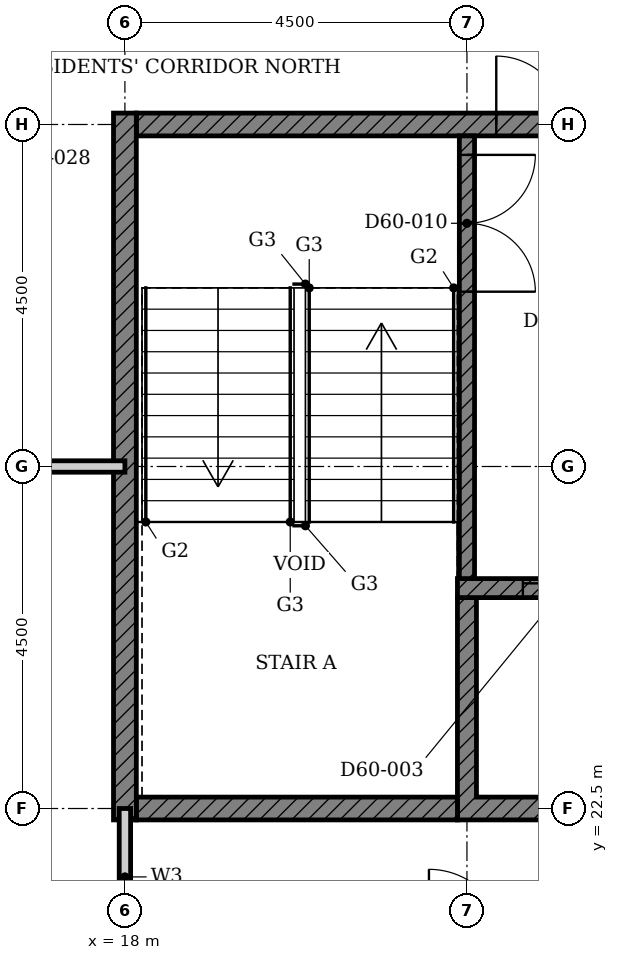
"""IFC4 building model, lengths in metres.
Left out: names, types, materials, properties, quantities, classifications, styles, units other than length and angle.
Written with IfcOpenShell. Run it as: python <this file> out.ifc"""

import sys

from ifc_helpers import new_model, si_unit, direction, frame, frame_2d, origin, place, context, subcontext, project, spatial, polyline, rectangle, outline, extrude, element, fill, save


model = new_model("IFC4")
c1 = context("Model", 3, precision=1e-05, world=origin(), true_north=direction((0.0, 1.0)))
c2 = subcontext(c1, "Body", "Model", "MODEL_VIEW")
j1 = project(units=[si_unit("LENGTHUNIT", "METRE"), si_unit("PLANEANGLEUNIT", "RADIAN")], contexts=[c1])
p1 = place(None, origin())
s1 = spatial("IfcSite", under=j1, at=p1, CompositionType="ELEMENT")
p2 = place(p1, origin())
s2 = spatial("IfcBuilding", under=s1, at=p2, CompositionType="ELEMENT")
p3 = place(p2, frame((0.0, 0.0, 237.9)))
s3 = spatial("IfcBuildingStorey", under=s2, at=p3, CompositionType="ELEMENT", Elevation=237.9)
p4 = place(p3, origin())
e1 = element("IfcWall", 1, at=p4, inside=s3, PredefinedType="SHEAR", context=c2, shape_type="SweptSolid", body=[
    extrude(outline(polyline([(22.375, 22.35), (25.197, 22.35), (25.197, 25.275), (24.947, 25.275), (24.947, 22.65), (22.625, 22.65), (22.625, 25.275), (22.375, 25.275), (22.375, 22.35)])), origin(), (0.0, 0.0, 1.0), 3.4),
])
p5 = place(p3, frame((18.15, 22.5, 0.0), z_axis=(0.0, 0.0, 1.0), x_axis=(1.0, 0.0, 0.0)))
e2 = element("IfcWall", 2, at=p5, inside=s3, PredefinedType="SHEAR", context=c2, shape_type="SweptSolid", body=[
    extrude(rectangle(XDim=4.225, YDim=0.3, at=frame_2d((2.113, 0.0))), origin(), (0.0, 0.0, 1.0), 3.4),
])
p6 = place(p3, frame((18.15, 31.5, 0.0), z_axis=(0.0, 0.0, 1.0), x_axis=(1.0, 0.0, 0.0)))
e3 = element("IfcWall", 3, at=p6, inside=s3, PredefinedType="SHEAR", context=c2, shape_type="SweptSolid", body=[
    extrude(rectangle(XDim=9.368, YDim=0.3, at=frame_2d((4.684, 0.0))), origin(), (0.0, 0.0, 1.0), 3.4),
])
p7 = place(p6, frame((4.736, 0.0, 0.0)))
e4 = element("IfcOpeningElement", 4, at=p7, cuts=e3, PredefinedType="OPENING", context=c2, shape_type="SweptSolid", body=[
    extrude(rectangle(XDim=1.8, YDim=2.1, at=frame_2d((0.9, 1.05))), frame((0.0, 0.16, 0.0), z_axis=(0.0, -1.0, 0.0), x_axis=(1.0, 0.0, 0.0)), (0.0, 0.0, 1.0), 0.32),
])
p8 = place(p3, frame((18.0, 22.35, 0.0), z_axis=(0.0, 0.0, 1.0), x_axis=(0.0, 1.0, 0.0)))
e5 = element("IfcWall", 5, at=p8, inside=s3, PredefinedType="SHEAR", context=c2, shape_type="SweptSolid", body=[
    extrude(rectangle(XDim=9.3, YDim=0.3, at=frame_2d((4.65, 0.0))), origin(), (0.0, 0.0, 1.0), 3.4),
])
p9 = place(p3, frame((22.375, 25.4, 0.0), z_axis=(0.0, 0.0, 1.0), x_axis=(1.0, 0.0, 0.0)))
e6 = element("IfcWall", 6, at=p9, inside=s3, PredefinedType="SHEAR", context=c2, shape_type="SweptSolid", body=[
    extrude(rectangle(XDim=15.678, YDim=0.25, at=frame_2d((7.839, 0.0))), origin(), (0.0, 0.0, 1.0), 3.4),
])
p10 = place(p9, frame((6.004, 0.0, 0.0)))
e7 = element("IfcOpeningElement", 7, at=p10, cuts=e6, PredefinedType="OPENING", context=c2, shape_type="SweptSolid", body=[
    extrude(rectangle(XDim=1.1, YDim=2.1, at=frame_2d((0.55, 1.05))), frame((0.0, 0.135, 0.0), z_axis=(0.0, -1.0, 0.0), x_axis=(1.0, 0.0, 0.0)), (0.0, 0.0, 1.0), 0.27),
])
p11 = place(p9, frame((0.861, 0.0, 0.0)))
e8 = element("IfcOpeningElement", 8, at=p11, cuts=e6, PredefinedType="OPENING", context=c2, shape_type="SweptSolid", body=[
    extrude(rectangle(XDim=1.1, YDim=2.1, at=frame_2d((0.55, 1.05))), frame((0.0, 0.135, 0.0), z_axis=(0.0, -1.0, 0.0), x_axis=(1.0, 0.0, 0.0)), (0.0, 0.0, 1.0), 0.27),
])
p12 = place(p9, frame((3.532, 0.0, 0.0)))
e9 = element("IfcOpeningElement", 9, at=p12, cuts=e6, PredefinedType="OPENING", context=c2, shape_type="SweptSolid", body=[
    extrude(rectangle(XDim=0.9, YDim=2.1, at=frame_2d((0.45, 1.05))), frame((0.0, 0.135, 0.0), z_axis=(0.0, -1.0, 0.0), x_axis=(1.0, 0.0, 0.0)), (0.0, 0.0, 1.0), 0.27),
])
p13 = place(p9, frame((11.246, 0.0, 0.0)))
e10 = element("IfcOpeningElement", 10, at=p13, cuts=e6, PredefinedType="OPENING", context=c2, shape_type="SweptSolid", body=[
    extrude(rectangle(XDim=0.9, YDim=2.1, at=frame_2d((0.45, 1.05))), frame((0.0, 0.135, 0.0), z_axis=(0.0, -1.0, 0.0), x_axis=(1.0, 0.0, 0.0)), (0.0, 0.0, 1.0), 0.27),
])
p14 = place(p3, frame((22.5, 31.35, 0.0), z_axis=(0.0, 0.0, 1.0), x_axis=(0.0, -1.0, 0.0)))
e11 = element("IfcWall", 11, at=p14, inside=s3, PredefinedType="SHEAR", context=c2, shape_type="SweptSolid", body=[
    extrude(rectangle(XDim=5.825, YDim=0.2, at=frame_2d((2.913, 0.0))), origin(), (0.0, 0.0, 1.0), 3.4),
])
p15 = place(p14, frame((0.25, 0.0, 0.0)))
e12 = element("IfcOpeningElement", 12, at=p15, cuts=e11, PredefinedType="OPENING", context=c2, shape_type="SweptSolid", body=[
    extrude(rectangle(XDim=1.8, YDim=2.1, at=frame_2d((0.9, 1.05))), frame((0.0, 0.11, 0.0), z_axis=(0.0, -1.0, 0.0), x_axis=(1.0, 0.0, 0.0)), (0.0, 0.0, 1.0), 0.22),
])
p16 = place(p3, frame((4.5, 27.0, 0.0), z_axis=(0.0, 0.0, 1.0), x_axis=(1.0, 0.0, 0.0)))
e13 = element("IfcWall", 13, at=p16, inside=s3, PredefinedType="PARTITIONING", context=c2, shape_type="SweptSolid", body=[
    extrude(rectangle(XDim=13.5, YDim=0.15, at=frame_2d((6.75, 0.0))), origin(), (0.0, 0.0, 1.0), 2.68),
])
p17 = place(p16, frame((5.35, 0.0, 0.0)))
e14 = element("IfcOpeningElement", 14, at=p17, cuts=e13, PredefinedType="OPENING", context=c2, shape_type="SweptSolid", body=[
    extrude(rectangle(XDim=1.0, YDim=2.1, at=frame_2d((0.5, 1.05))), frame((0.0, 0.085, 0.0), z_axis=(0.0, -1.0, 0.0), x_axis=(1.0, 0.0, 0.0)), (0.0, 0.0, 1.0), 0.17),
])
p18 = place(p3, frame((18.0, 20.7, 0.0), z_axis=(0.0, 0.0, 1.0), x_axis=(0.0, 1.0, 0.0)))
e15 = element("IfcWall", 15, at=p18, inside=s3, PredefinedType="PARTITIONING", context=c2, shape_type="SweptSolid", body=[
    extrude(rectangle(XDim=1.8, YDim=0.15, at=frame_2d((0.9, 0.0))), origin(), (0.0, 0.0, 1.0), 3.4),
])
p19 = place(p11, origin())
e16 = element("IfcDoor", 16, at=p19, inside=s3, OperationType="DOUBLE_DOOR_SLIDING", PredefinedType="DOOR", context=c2, shape_type="SweptSolid", body=[
    extrude(rectangle(XDim=1.1, YDim=2.1, at=frame_2d((0.55, 1.05))), frame((0.0, 0.025, 0.0), z_axis=(0.0, -1.0, 0.0), x_axis=(1.0, 0.0, 0.0)), (0.0, 0.0, 1.0), 0.05),
])
fill(e8, e16)
p20 = place(p15, origin())
e17 = element("IfcDoor", 17, at=p20, inside=s3, OperationType="DOUBLE_DOOR_SINGLE_SWING", PredefinedType="DOOR", context=c2, shape_type="SweptSolid", body=[
    extrude(rectangle(XDim=1.8, YDim=2.1, at=frame_2d((0.9, 1.05))), frame((0.0, 0.025, 0.0), z_axis=(0.0, -1.0, 0.0), x_axis=(1.0, 0.0, 0.0)), (0.0, 0.0, 1.0), 0.05),
])
fill(e12, e17)
p21 = place(p7, origin())
e18 = element("IfcDoor", 18, at=p21, inside=s3, OperationType="DOUBLE_DOOR_SINGLE_SWING", PredefinedType="DOOR", context=c2, shape_type="SweptSolid", body=[
    extrude(rectangle(XDim=1.8, YDim=2.1, at=frame_2d((0.9, 1.05))), frame((0.0, 0.025, 0.0), z_axis=(0.0, -1.0, 0.0), x_axis=(1.0, 0.0, 0.0)), (0.0, 0.0, 1.0), 0.05),
])
fill(e4, e18)
save(model, sys.argv[1])
